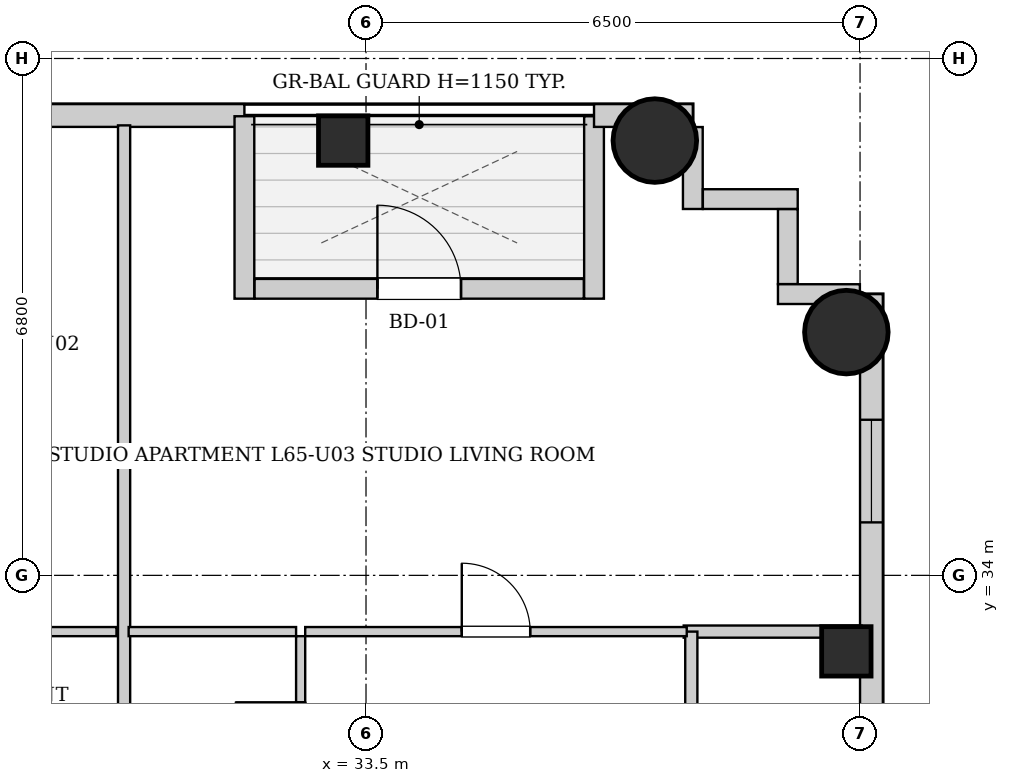
"""IFC4 building model, lengths in metres.
Left out: names, types, materials, properties, quantities, classifications, styles, units other than length and angle.
Written with IfcOpenShell. Run it as: python <this file> out.ifc"""

import sys

from ifc_helpers import new_model, si_unit, direction, frame, frame_2d, origin, origin_2d, place, context, subcontext, project, spatial, rectangle, circle, extrude, element, fill, save


model = new_model("IFC4")
c1 = context("Model", 3, precision=1e-05, world=origin(), true_north=direction((0.0, 1.0)))
c2 = subcontext(c1, "Body", "Model", "MODEL_VIEW")
j1 = project(units=[si_unit("LENGTHUNIT", "METRE"), si_unit("PLANEANGLEUNIT", "RADIAN")], contexts=[c1])
p1 = place(None, origin())
s1 = spatial("IfcSite", under=j1, at=p1, CompositionType="ELEMENT")
p2 = place(p1, origin())
s2 = spatial("IfcBuilding", under=s1, at=p2, CompositionType="ELEMENT")
p3 = place(p2, frame((0.0, 0.0, 224.1)))
s3 = spatial("IfcBuildingStorey", under=s2, at=p3, CompositionType="ELEMENT", Elevation=224.1)
p4 = place(p3, frame((33.2, 39.72, 0.0), z_axis=(0.0, 0.0, 1.0), x_axis=(1.0, 0.0, 0.0)))
e1 = element("IfcColumn", 1, at=p4, inside=s3, PredefinedType="COLUMN", context=c2, shape_type="SweptSolid", body=[
    extrude(rectangle(XDim=0.65, YDim=0.65, at=origin_2d()), origin(), (0.0, 0.0, 1.0), 3.4),
])
p5 = place(p3, frame((37.3, 39.72, 0.0), z_axis=(0.0, 0.0, 1.0), x_axis=(1.0, 0.0, 0.0)))
e2 = element("IfcColumn", 2, at=p5, inside=s3, PredefinedType="COLUMN", context=c2, shape_type="SweptSolid", body=[
    extrude(circle(Radius=0.55, at=origin_2d()), origin(), (0.0, 0.0, 1.0), 3.4),
])
p6 = place(p3, frame((39.82, 33.0, 0.0), z_axis=(0.0, 0.0, 1.0), x_axis=(1.0, 0.0, 0.0)))
e3 = element("IfcColumn", 3, at=p6, inside=s3, PredefinedType="COLUMN", context=c2, shape_type="SweptSolid", body=[
    extrude(rectangle(XDim=0.65, YDim=0.65, at=origin_2d()), origin(), (0.0, 0.0, 1.0), 3.4),
])
p7 = place(p3, frame((39.82, 37.2, 0.0), z_axis=(0.0, 0.0, 1.0), x_axis=(1.0, 0.0, 0.0)))
e4 = element("IfcColumn", 4, at=p7, inside=s3, PredefinedType="COLUMN", context=c2, shape_type="SweptSolid", body=[
    extrude(circle(Radius=0.55, at=origin_2d()), origin(), (0.0, 0.0, 1.0), 3.4),
])
p8 = place(p3, frame((13.1, 40.05, 0.0), z_axis=(0.0, 0.0, 1.0), x_axis=(1.0, 0.0, 0.0)))
e5 = element("IfcWall", 5, at=p8, inside=s3, PredefinedType="SOLIDWALL", context=c2, shape_type="SweptSolid", body=[
    extrude(rectangle(XDim=18.8, YDim=0.3, at=frame_2d((9.4, 0.0))), origin(), (0.0, 0.0, 1.0), 3.14),
])
p9 = place(p8, frame((1.806, 0.0, 0.55)))
e6 = element("IfcOpeningElement", 6, at=p9, cuts=e5, PredefinedType="OPENING", context=c2, shape_type="SweptSolid", body=[
    extrude(rectangle(XDim=1.35, YDim=1.2, at=frame_2d((0.675, 0.6))), frame((0.0, 0.16, 0.0), z_axis=(0.0, -1.0, 0.0), x_axis=(1.0, 0.0, 0.0)), (0.0, 0.0, 1.0), 0.32),
])
p10 = place(p8, frame((5.641, 0.0, 0.55)))
e7 = element("IfcOpeningElement", 7, at=p10, cuts=e5, PredefinedType="OPENING", context=c2, shape_type="SweptSolid", body=[
    extrude(rectangle(XDim=1.35, YDim=1.2, at=frame_2d((0.675, 0.6))), frame((0.0, 0.16, 0.0), z_axis=(0.0, -1.0, 0.0), x_axis=(1.0, 0.0, 0.0)), (0.0, 0.0, 1.0), 0.32),
])
p11 = place(p8, frame((8.55, 0.0, 0.55)))
e8 = element("IfcOpeningElement", 8, at=p11, cuts=e5, PredefinedType="OPENING", context=c2, shape_type="SweptSolid", body=[
    extrude(rectangle(XDim=0.85, YDim=1.2, at=frame_2d((0.425, 0.6))), frame((0.0, 0.16, 0.0), z_axis=(0.0, -1.0, 0.0), x_axis=(1.0, 0.0, 0.0)), (0.0, 0.0, 1.0), 0.32),
])
p12 = place(p8, frame((14.4, 0.0, 0.55)))
e9 = element("IfcOpeningElement", 9, at=p12, cuts=e5, PredefinedType="OPENING", context=c2, shape_type="SweptSolid", body=[
    extrude(rectangle(XDim=1.35, YDim=1.2, at=frame_2d((0.675, 0.6))), frame((0.0, 0.16, 0.0), z_axis=(0.0, -1.0, 0.0), x_axis=(1.0, 0.0, 0.0)), (0.0, 0.0, 1.0), 0.32),
])
p13 = place(p3, frame((31.9, 40.04, 0.0), z_axis=(0.0, 0.0, 1.0), x_axis=(0.0, -1.0, 0.0)))
e10 = element("IfcWall", 10, at=p13, inside=s3, PredefinedType="SOLIDWALL", context=c2, shape_type="SweptSolid", body=[
    extrude(rectangle(XDim=2.4, YDim=0.26, at=frame_2d((1.2, 0.0))), origin(), (0.0, 0.0, 1.0), 3.14),
])
p14 = place(p3, frame((32.034, 37.77, 0.0), z_axis=(0.0, 0.0, 1.0), x_axis=(1.0, 0.0, 0.0)))
e11 = element("IfcWall", 11, at=p14, inside=s3, PredefinedType="SOLIDWALL", context=c2, shape_type="SweptSolid", body=[
    extrude(rectangle(XDim=4.332, YDim=0.26, at=frame_2d((2.166, 0.0))), origin(), (0.0, 0.0, 1.0), 3.14),
])
p15 = place(p14, frame((1.616, 0.0, 0.0)))
e12 = element("IfcOpeningElement", 12, at=p15, cuts=e11, PredefinedType="OPENING", context=c2, shape_type="SweptSolid", body=[
    extrude(rectangle(XDim=1.1, YDim=2.0, at=frame_2d((0.55, 1.0))), frame((0.0, 0.14, 0.0), z_axis=(0.0, -1.0, 0.0), x_axis=(1.0, 0.0, 0.0)), (0.0, 0.0, 1.0), 0.28),
])
p16 = place(p3, frame((36.5, 37.64, 0.0), z_axis=(0.0, 0.0, 1.0), x_axis=(0.0, 1.0, 0.0)))
e13 = element("IfcWall", 13, at=p16, inside=s3, PredefinedType="SOLIDWALL", context=c2, shape_type="SweptSolid", body=[
    extrude(rectangle(XDim=2.4, YDim=0.26, at=frame_2d((1.2, 0.0))), origin(), (0.0, 0.0, 1.0), 3.14),
])
p17 = place(p3, frame((36.5, 40.05, 0.0), z_axis=(0.0, 0.0, 1.0), x_axis=(1.0, 0.0, 0.0)))
e14 = element("IfcWall", 14, at=p17, inside=s3, PredefinedType="SOLIDWALL", context=c2, shape_type="SweptSolid", body=[
    extrude(rectangle(XDim=1.3, YDim=0.3, at=frame_2d((0.65, 0.0))), origin(), (0.0, 0.0, 1.0), 3.14),
])
p18 = place(p3, frame((40.15, 37.7, 0.0), z_axis=(0.0, 0.0, 1.0), x_axis=(0.0, -1.0, 0.0)))
e15 = element("IfcWall", 15, at=p18, inside=s3, PredefinedType="SOLIDWALL", context=c2, shape_type="SweptSolid", body=[
    extrude(rectangle(XDim=31.4, YDim=0.3, at=frame_2d((15.7, 0.0))), origin(), (0.0, 0.0, 1.0), 3.14),
])
p19 = place(p18, frame((28.396, 0.0, 0.55)))
e16 = element("IfcOpeningElement", 16, at=p19, cuts=e15, PredefinedType="OPENING", context=c2, shape_type="SweptSolid", body=[
    extrude(rectangle(XDim=1.35, YDim=1.2, at=frame_2d((0.675, 0.6))), frame((0.0, 0.16, 0.0), z_axis=(0.0, -1.0, 0.0), x_axis=(1.0, 0.0, 0.0)), (0.0, 0.0, 1.0), 0.32),
])
p20 = place(p18, frame((1.653, 0.0, 0.55)))
e17 = element("IfcOpeningElement", 17, at=p20, cuts=e15, PredefinedType="OPENING", context=c2, shape_type="SweptSolid", body=[
    extrude(rectangle(XDim=1.35, YDim=1.2, at=frame_2d((0.675, 0.6))), frame((0.0, 0.16, 0.0), z_axis=(0.0, -1.0, 0.0), x_axis=(1.0, 0.0, 0.0)), (0.0, 0.0, 1.0), 0.32),
])
p21 = place(p18, frame((19.683, 0.0, 0.55)))
e18 = element("IfcOpeningElement", 18, at=p21, cuts=e15, PredefinedType="OPENING", context=c2, shape_type="SweptSolid", body=[
    extrude(rectangle(XDim=1.35, YDim=1.2, at=frame_2d((0.675, 0.6))), frame((0.0, 0.16, 0.0), z_axis=(0.0, -1.0, 0.0), x_axis=(1.0, 0.0, 0.0)), (0.0, 0.0, 1.0), 0.32),
])
p22 = place(p18, frame((10.367, 0.0, 0.55)))
e19 = element("IfcOpeningElement", 19, at=p22, cuts=e15, PredefinedType="OPENING", context=c2, shape_type="SweptSolid", body=[
    extrude(rectangle(XDim=1.35, YDim=1.2, at=frame_2d((0.675, 0.6))), frame((0.0, 0.16, 0.0), z_axis=(0.0, -1.0, 0.0), x_axis=(1.0, 0.0, 0.0)), (0.0, 0.0, 1.0), 0.32),
])
p23 = place(p3, frame((37.8, 39.898, 0.0), z_axis=(0.0, 0.0, 1.0), x_axis=(0.0, -1.0, 0.0)))
e20 = element("IfcWall", 20, at=p23, inside=s3, PredefinedType="SOLIDWALL", context=c2, shape_type="SweptSolid", body=[
    extrude(rectangle(XDim=1.078, YDim=0.26, at=frame_2d((0.539, 0.0))), origin(), (0.0, 0.0, 1.0), 3.14),
])
p24 = place(p3, frame((37.932, 38.95, 0.0), z_axis=(0.0, 0.0, 1.0), x_axis=(1.0, 0.0, 0.0)))
e21 = element("IfcWall", 21, at=p24, inside=s3, PredefinedType="SOLIDWALL", context=c2, shape_type="SweptSolid", body=[
    extrude(rectangle(XDim=1.248, YDim=0.26, at=frame_2d((0.624, 0.0))), origin(), (0.0, 0.0, 1.0), 3.14),
])
p25 = place(p3, frame((39.05, 38.818, 0.0), z_axis=(0.0, 0.0, 1.0), x_axis=(0.0, -1.0, 0.0)))
e22 = element("IfcWall", 22, at=p25, inside=s3, PredefinedType="SOLIDWALL", context=c2, shape_type="SweptSolid", body=[
    extrude(rectangle(XDim=0.986, YDim=0.26, at=frame_2d((0.493, 0.0))), origin(), (0.0, 0.0, 1.0), 3.14),
])
p26 = place(p3, frame((38.92, 37.7, 0.0), z_axis=(0.0, 0.0, 1.0), x_axis=(1.0, 0.0, 0.0)))
e23 = element("IfcWall", 23, at=p26, inside=s3, PredefinedType="SOLIDWALL", context=c2, shape_type="SweptSolid", body=[
    extrude(rectangle(XDim=1.078, YDim=0.26, at=frame_2d((0.539, 0.0))), origin(), (0.0, 0.0, 1.0), 3.14),
])
p27 = place(p3, frame((27.25, 33.26, 0.0), z_axis=(0.0, 0.0, 1.0), x_axis=(1.0, 0.0, 0.0)))
e24 = element("IfcWall", 24, at=p27, inside=s3, PredefinedType="PARTITIONING", context=c2, shape_type="SweptSolid", body=[
    extrude(rectangle(XDim=2.967, YDim=0.12, at=frame_2d((1.483, 0.0))), origin(), (0.0, 0.0, 1.0), 3.14),
])
p28 = place(p27, frame((1.033, 0.0, 0.0)))
e25 = element("IfcOpeningElement", 25, at=p28, cuts=e24, PredefinedType="OPENING", context=c2, shape_type="SweptSolid", body=[
    extrude(rectangle(XDim=0.9, YDim=2.05, at=frame_2d((0.45, 1.025))), frame((0.0, 0.07, 0.0), z_axis=(0.0, -1.0, 0.0), x_axis=(1.0, 0.0, 0.0)), (0.0, 0.0, 1.0), 0.14),
])
p29 = place(p3, frame((37.68, 33.26, 0.0), z_axis=(0.0, 0.0, 1.0), x_axis=(1.0, 0.0, 0.0)))
e26 = element("IfcWall", 26, at=p29, inside=s3, PredefinedType="PARTITIONING", context=c2, shape_type="SweptSolid", body=[
    extrude(rectangle(XDim=2.34, YDim=0.16, at=frame_2d((1.17, 0.0))), origin(), (0.0, 0.0, 1.0), 3.14),
])
p30 = place(p3, frame((37.78, 30.6, 0.0), z_axis=(0.0, 0.0, 1.0), x_axis=(0.0, 1.0, 0.0)))
e27 = element("IfcWall", 27, at=p30, inside=s3, PredefinedType="PARTITIONING", context=c2, shape_type="SweptSolid", body=[
    extrude(rectangle(XDim=2.66, YDim=0.16, at=frame_2d((1.33, 0.0))), origin(), (0.0, 0.0, 1.0), 3.14),
])
p31 = place(p3, frame((30.317, 30.6, 0.0), z_axis=(0.0, 0.0, 1.0), x_axis=(0.0, 1.0, 0.0)))
e28 = element("IfcWall", 28, at=p31, inside=s3, PredefinedType="PARTITIONING", context=c2, shape_type="SweptSolid", body=[
    extrude(rectangle(XDim=9.32, YDim=0.16, at=frame_2d((4.66, 0.0))), origin(), (0.0, 0.0, 1.0), 3.14),
])
p32 = place(p3, frame((32.64, 30.6, 0.0), z_axis=(0.0, 0.0, 1.0), x_axis=(0.0, 1.0, 0.0)))
e29 = element("IfcWall", 29, at=p32, inside=s3, PredefinedType="PARTITIONING", context=c2, shape_type="SweptSolid", body=[
    extrude(rectangle(XDim=2.6, YDim=0.12, at=frame_2d((1.3, 0.0))), origin(), (0.0, 0.0, 1.0), 3.14),
])
p33 = place(p32, frame((0.87, 0.0, 0.0)))
e30 = element("IfcOpeningElement", 30, at=p33, cuts=e29, PredefinedType="OPENING", context=c2, shape_type="SweptSolid", body=[
    extrude(rectangle(XDim=0.86, YDim=2.05, at=frame_2d((0.43, 1.025))), frame((0.0, 0.07, 0.0), z_axis=(0.0, -1.0, 0.0), x_axis=(1.0, 0.0, 0.0)), (0.0, 0.0, 1.0), 0.14),
])
p34 = place(p3, frame((30.377, 33.26, 0.0), z_axis=(0.0, 0.0, 1.0), x_axis=(1.0, 0.0, 0.0)))
e31 = element("IfcWall", 31, at=p34, inside=s3, PredefinedType="PARTITIONING", context=c2, shape_type="SweptSolid", body=[
    extrude(rectangle(XDim=2.203, YDim=0.12, at=frame_2d((1.102, 0.0))), origin(), (0.0, 0.0, 1.0), 3.14),
])
p35 = place(p3, frame((32.7, 33.26, 0.0), z_axis=(0.0, 0.0, 1.0), x_axis=(1.0, 0.0, 0.0)))
e32 = element("IfcWall", 32, at=p35, inside=s3, PredefinedType="PARTITIONING", context=c2, shape_type="SweptSolid", body=[
    extrude(rectangle(XDim=5.02, YDim=0.12, at=frame_2d((2.51, 0.0))), origin(), (0.0, 0.0, 1.0), 3.14),
])
p36 = place(p35, frame((2.06, 0.0, 0.0)))
e33 = element("IfcOpeningElement", 33, at=p36, cuts=e32, PredefinedType="OPENING", context=c2, shape_type="SweptSolid", body=[
    extrude(rectangle(XDim=0.9, YDim=2.05, at=frame_2d((0.45, 1.025))), frame((0.0, 0.07, 0.0), z_axis=(0.0, -1.0, 0.0), x_axis=(1.0, 0.0, 0.0)), (0.0, 0.0, 1.0), 0.14),
])
p37 = place(p33, origin())
e34 = element("IfcDoor", 34, at=p37, inside=s3, OperationType="SINGLE_SWING_RIGHT", PredefinedType="DOOR", context=c2, shape_type="SweptSolid", body=[
    extrude(rectangle(XDim=0.86, YDim=2.05, at=frame_2d((0.43, 1.025))), frame((0.0, 0.025, 0.0), z_axis=(0.0, -1.0, 0.0), x_axis=(1.0, 0.0, 0.0)), (0.0, 0.0, 1.0), 0.05),
])
fill(e30, e34)
p38 = place(p36, origin())
e35 = element("IfcDoor", 35, at=p38, inside=s3, OperationType="SINGLE_SWING_LEFT", PredefinedType="DOOR", context=c2, shape_type="SweptSolid", body=[
    extrude(rectangle(XDim=0.9, YDim=2.05, at=frame_2d((0.45, 1.025))), frame((0.0, 0.025, 0.0), z_axis=(0.0, -1.0, 0.0), x_axis=(1.0, 0.0, 0.0)), (0.0, 0.0, 1.0), 0.05),
])
fill(e33, e35)
p39 = place(p15, origin())
e36 = element("IfcDoor", 36, at=p39, inside=s3, OperationType="SINGLE_SWING_LEFT", PredefinedType="DOOR", context=c2, shape_type="SweptSolid", body=[
    extrude(rectangle(XDim=1.1, YDim=2.0, at=frame_2d((0.55, 1.0))), frame((0.0, 0.025, 0.0), z_axis=(0.0, -1.0, 0.0), x_axis=(1.0, 0.0, 0.0)), (0.0, 0.0, 1.0), 0.05),
])
fill(e12, e36)
p40 = place(p20, origin())
e37 = element("IfcWindow", 37, at=p40, inside=s3, PartitioningType="SINGLE_PANEL", PredefinedType="WINDOW", context=c2, shape_type="SweptSolid", body=[
    extrude(rectangle(XDim=1.35, YDim=1.2, at=frame_2d((0.675, 0.6))), frame((0.0, 0.03, 0.0), z_axis=(0.0, -1.0, 0.0), x_axis=(1.0, 0.0, 0.0)), (0.0, 0.0, 1.0), 0.06),
])
fill(e17, e37)
save(model, sys.argv[1])
